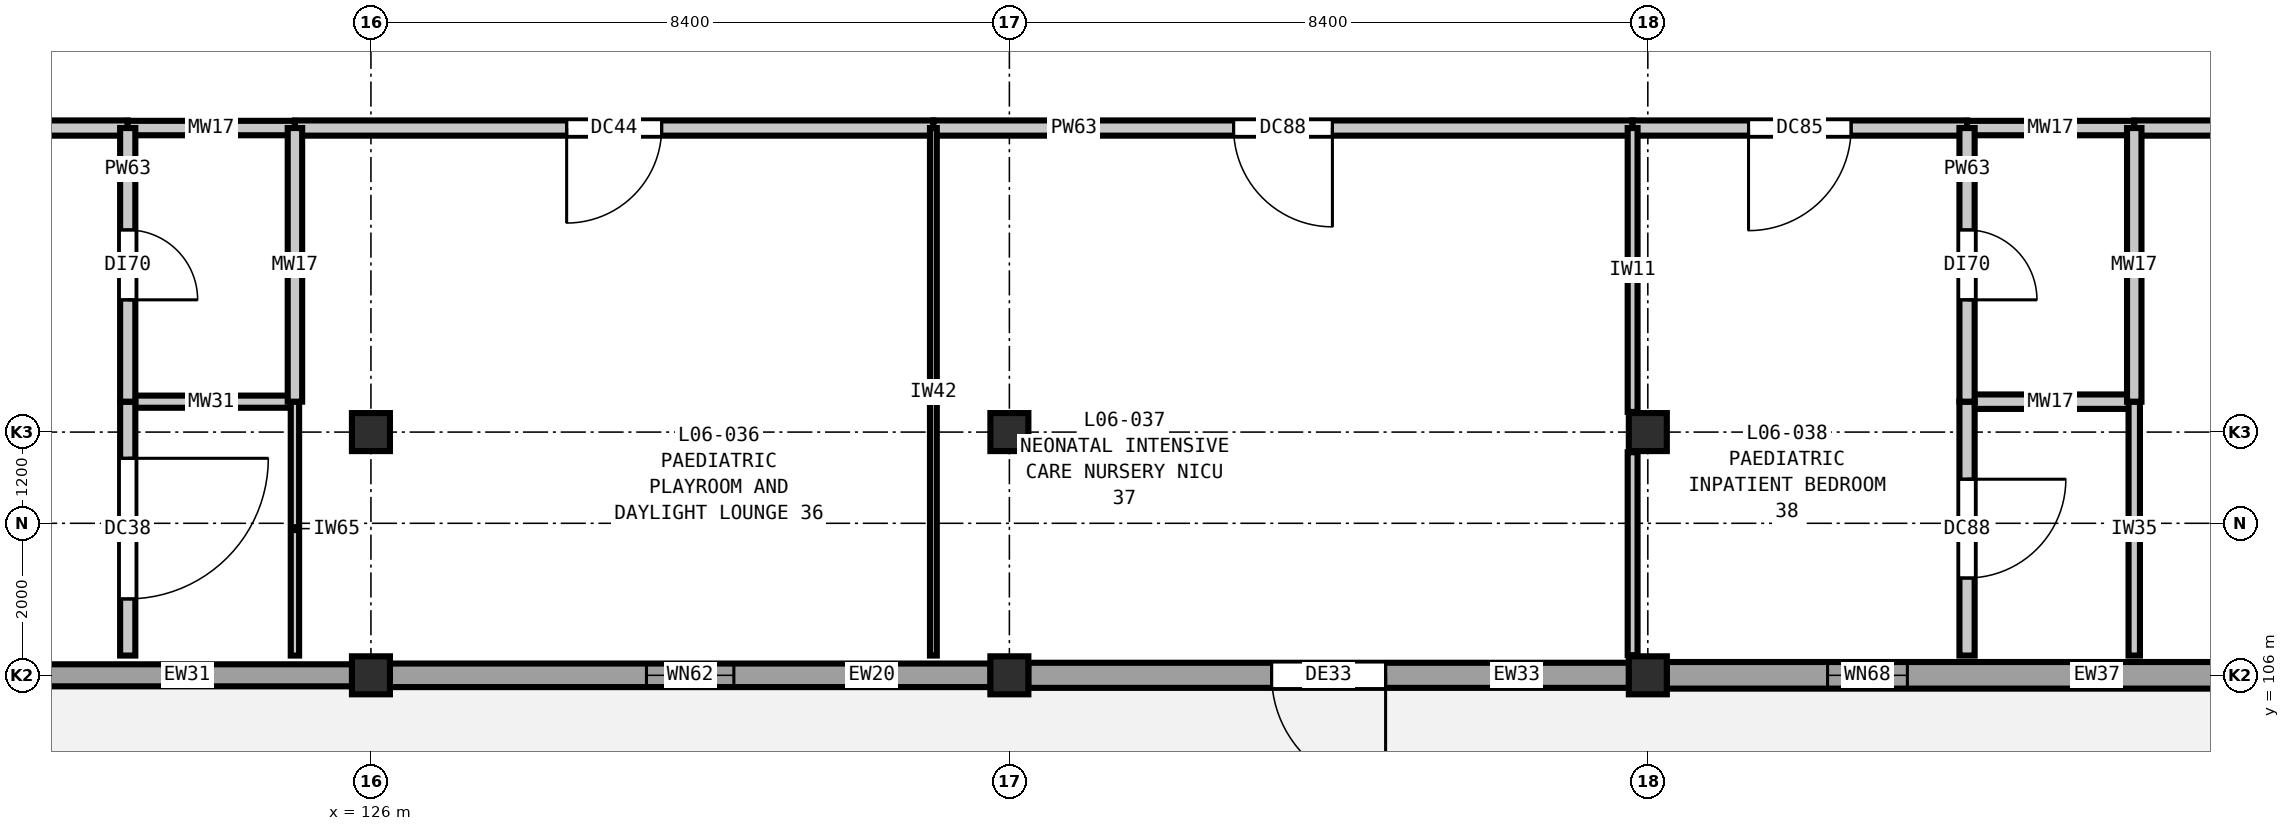
"""IFC4 building model, lengths in metres.
Left out: names, types, materials, properties, quantities, classifications, styles, units other than length and angle.
Written with IfcOpenShell. Run it as: python <this file> out.ifc"""

import sys

from ifc_helpers import new_model, si_unit, direction, frame, frame_2d, origin, origin_2d, place, context, subcontext, project, spatial, rectangle, extrude, element, fill, save


model = new_model("IFC4")
c1 = context("Model", 3, precision=1e-05, world=origin(), true_north=direction((0.0, 1.0)))
c2 = subcontext(c1, "Body", "Model", "MODEL_VIEW")
j1 = project(units=[si_unit("LENGTHUNIT", "METRE"), si_unit("PLANEANGLEUNIT", "RADIAN")], contexts=[c1])
p1 = place(None, origin())
s1 = spatial("IfcSite", under=j1, at=p1, CompositionType="ELEMENT")
p2 = place(p1, origin())
s2 = spatial("IfcBuilding", under=s1, at=p2, CompositionType="ELEMENT")
p3 = place(p2, frame((0.0, 0.0, 28.8)))
s3 = spatial("IfcBuildingStorey", under=s2, at=p3, CompositionType="ELEMENT", Elevation=28.8)
for number, where, z_axis, x_axis in (
    (1, (126.0, 106.0, 0.0), (0.0, 0.0, 1.0), (1.0, 0.0, 0.0)),
    (2, (126.0, 109.2, 0.0), (0.0, 0.0, 1.0), (1.0, 0.0, 0.0)),
    (3, (134.4, 106.0, 0.0), (0.0, 0.0, 1.0), (1.0, 0.0, 0.0)),
    (4, (134.4, 109.2, 0.0), (0.0, 0.0, 1.0), (1.0, 0.0, 0.0)),
    (5, (142.8, 106.0, 0.0), (0.0, 0.0, 1.0), (1.0, 0.0, 0.0)),
    (6, (142.8, 109.2, 0.0), (0.0, 0.0, 1.0), (1.0, 0.0, 0.0)),
):
    element("IfcColumn", number, at=place(p3, frame(where, z_axis=z_axis, x_axis=x_axis)), inside=s3, PredefinedType="COLUMN", context=c2, shape_type="SweptSolid", body=[
        extrude(rectangle(XDim=0.5, YDim=0.5, at=origin_2d()), origin(), (0.0, 0.0, 1.0), 4.2),
    ])
p4 = place(p3, frame((150.952, 106.0, 0.0), z_axis=(0.0, 0.0, 1.0), x_axis=(-1.0, 0.0, 0.0)))
e7 = element("IfcWall", 7, at=p4, inside=s3, PredefinedType="SOLIDWALL", context=c2, shape_type="SweptSolid", body=[
    extrude(rectangle(XDim=7.904, YDim=0.35, at=frame_2d((3.952, 0.0))), origin(), (0.0, 0.0, 1.0), 3.48),
])
p5 = place(p4, frame((4.737, 0.0, 0.9)))
e8 = element("IfcOpeningElement", 8, at=p5, cuts=e7, PredefinedType="OPENING", context=c2, shape_type="SweptSolid", body=[
    extrude(rectangle(XDim=1.05, YDim=1.4, at=frame_2d((0.525, 0.7))), frame((0.0, 0.185, 0.0), z_axis=(0.0, -1.0, 0.0), x_axis=(1.0, 0.0, 0.0)), (0.0, 0.0, 1.0), 0.37),
])
p6 = place(p3, frame((142.552, 106.0, 0.0), z_axis=(0.0, 0.0, 1.0), x_axis=(-1.0, 0.0, 0.0)))
e9 = element("IfcWall", 9, at=p6, inside=s3, PredefinedType="SOLIDWALL", context=c2, shape_type="SweptSolid", body=[
    extrude(rectangle(XDim=7.904, YDim=0.33, at=frame_2d((3.952, 0.0))), origin(), (0.0, 0.0, 1.0), 3.48),
])
p7 = place(p6, frame((3.202, 0.0, 0.0)))
e10 = element("IfcOpeningElement", 10, at=p7, cuts=e9, PredefinedType="OPENING", context=c2, shape_type="SweptSolid", body=[
    extrude(rectangle(XDim=1.5, YDim=2.2, at=frame_2d((0.75, 1.1))), frame((0.0, 0.175, 0.0), z_axis=(0.0, -1.0, 0.0), x_axis=(1.0, 0.0, 0.0)), (0.0, 0.0, 1.0), 0.35),
])
p8 = place(p3, frame((134.152, 106.0, 0.0), z_axis=(0.0, 0.0, 1.0), x_axis=(-1.0, 0.0, 0.0)))
e11 = element("IfcWall", 11, at=p8, inside=s3, PredefinedType="SOLIDWALL", context=c2, shape_type="SweptSolid", body=[
    extrude(rectangle(XDim=7.904, YDim=0.31, at=frame_2d((3.952, 0.0))), origin(), (0.0, 0.0, 1.0), 3.48),
])
p9 = place(p8, frame((3.377, 0.0, 0.9)))
e12 = element("IfcOpeningElement", 12, at=p9, cuts=e11, PredefinedType="OPENING", context=c2, shape_type="SweptSolid", body=[
    extrude(rectangle(XDim=1.15, YDim=1.4, at=frame_2d((0.575, 0.7))), frame((0.0, 0.165, 0.0), z_axis=(0.0, -1.0, 0.0), x_axis=(1.0, 0.0, 0.0)), (0.0, 0.0, 1.0), 0.33),
])
p10 = place(p3, frame((125.752, 106.0, 0.0), z_axis=(0.0, 0.0, 1.0), x_axis=(-1.0, 0.0, 0.0)))
e13 = element("IfcWall", 13, at=p10, inside=s3, PredefinedType="SOLIDWALL", context=c2, shape_type="SweptSolid", body=[
    extrude(rectangle(XDim=7.904, YDim=0.29, at=frame_2d((3.952, 0.0))), origin(), (0.0, 0.0, 1.0), 3.48),
])
p11 = place(p10, frame((4.593, 0.0, 0.9)))
e14 = element("IfcOpeningElement", 14, at=p11, cuts=e13, PredefinedType="OPENING", context=c2, shape_type="SweptSolid", body=[
    extrude(rectangle(XDim=1.25, YDim=1.4, at=frame_2d((0.625, 0.7))), frame((0.0, 0.155, 0.0), z_axis=(0.0, -1.0, 0.0), x_axis=(1.0, 0.0, 0.0)), (0.0, 0.0, 1.0), 0.31),
])
p12 = place(p3, frame((122.8, 109.6, 0.0), z_axis=(0.0, 0.0, 1.0), x_axis=(1.0, 0.0, 0.0)))
e15 = element("IfcWall", 15, at=p12, inside=s3, PredefinedType="PLUMBINGWALL", context=c2, shape_type="SweptSolid", body=[
    extrude(rectangle(XDim=2.2, YDim=0.16, at=frame_2d((1.1, 0.0))), origin(), (0.0, 0.0, 1.0), 3.92),
])
p13 = place(p3, frame((147.0, 109.6, 0.0), z_axis=(0.0, 0.0, 1.0), x_axis=(1.0, 0.0, 0.0)))
e16 = element("IfcWall", 16, at=p13, inside=s3, PredefinedType="PLUMBINGWALL", context=c2, shape_type="SweptSolid", body=[
    extrude(rectangle(XDim=2.2, YDim=0.19, at=frame_2d((1.1, 0.0))), origin(), (0.0, 0.0, 1.0), 3.92),
])
p14 = place(p3, frame((118.4, 113.2, 0.0), z_axis=(0.0, 0.0, 1.0), x_axis=(1.0, 0.0, 0.0)))
e17 = element("IfcWall", 17, at=p14, inside=s3, PredefinedType="PARTITIONING", context=c2, shape_type="SweptSolid", body=[
    extrude(rectangle(XDim=4.4, YDim=0.2, at=frame_2d((2.2, 0.0))), origin(), (0.0, 0.0, 1.0), 3.92),
])
p15 = place(p14, frame((1.275, 0.0, 0.0)))
e18 = element("IfcOpeningElement", 18, at=p15, cuts=e17, PredefinedType="OPENING", context=c2, shape_type="SweptSolid", body=[
    extrude(rectangle(XDim=1.85, YDim=2.3, at=frame_2d((0.925, 1.15))), frame((0.0, 0.11, 0.0), z_axis=(0.0, -1.0, 0.0), x_axis=(1.0, 0.0, 0.0)), (0.0, 0.0, 1.0), 0.22),
])
p16 = place(p3, frame((122.8, 113.2, 0.0), z_axis=(0.0, 0.0, 1.0), x_axis=(1.0, 0.0, 0.0)))
e19 = element("IfcWall", 19, at=p16, inside=s3, PredefinedType="PLUMBINGWALL", context=c2, shape_type="SweptSolid", body=[
    extrude(rectangle(XDim=2.2, YDim=0.19, at=frame_2d((1.1, 0.0))), origin(), (0.0, 0.0, 1.0), 3.92),
])
p17 = place(p3, frame((125.0, 113.2, 0.0), z_axis=(0.0, 0.0, 1.0), x_axis=(1.0, 0.0, 0.0)))
e20 = element("IfcWall", 20, at=p17, inside=s3, PredefinedType="PARTITIONING", context=c2, shape_type="SweptSolid", body=[
    extrude(rectangle(XDim=8.4, YDim=0.2, at=frame_2d((4.2, 0.0))), origin(), (0.0, 0.0, 1.0), 3.92),
])
p18 = place(p17, frame((3.575, 0.0, 0.0)))
e21 = element("IfcOpeningElement", 21, at=p18, cuts=e20, PredefinedType="OPENING", context=c2, shape_type="SweptSolid", body=[
    extrude(rectangle(XDim=1.25, YDim=2.15, at=frame_2d((0.625, 1.075))), frame((0.0, 0.11, 0.0), z_axis=(0.0, -1.0, 0.0), x_axis=(1.0, 0.0, 0.0)), (0.0, 0.0, 1.0), 0.22),
])
p19 = place(p3, frame((133.4, 113.2, 0.0), z_axis=(0.0, 0.0, 1.0), x_axis=(1.0, 0.0, 0.0)))
e22 = element("IfcWall", 22, at=p19, inside=s3, PredefinedType="PARTITIONING", context=c2, shape_type="SweptSolid", body=[
    extrude(rectangle(XDim=9.2, YDim=0.2, at=frame_2d((4.6, 0.0))), origin(), (0.0, 0.0, 1.0), 3.92),
])
p20 = place(p19, frame((3.95, 0.0, 0.0)))
e23 = element("IfcOpeningElement", 23, at=p20, cuts=e22, PredefinedType="OPENING", context=c2, shape_type="SweptSolid", body=[
    extrude(rectangle(XDim=1.3, YDim=2.2, at=frame_2d((0.65, 1.1))), frame((0.0, 0.11, 0.0), z_axis=(0.0, -1.0, 0.0), x_axis=(1.0, 0.0, 0.0)), (0.0, 0.0, 1.0), 0.22),
])
p21 = place(p3, frame((142.6, 113.2, 0.0), z_axis=(0.0, 0.0, 1.0), x_axis=(1.0, 0.0, 0.0)))
e24 = element("IfcWall", 24, at=p21, inside=s3, PredefinedType="PARTITIONING", context=c2, shape_type="SweptSolid", body=[
    extrude(rectangle(XDim=4.4, YDim=0.2, at=frame_2d((2.2, 0.0))), origin(), (0.0, 0.0, 1.0), 3.92),
])
p22 = place(p21, frame((1.525, 0.0, 0.0)))
e25 = element("IfcOpeningElement", 25, at=p22, cuts=e24, PredefinedType="OPENING", context=c2, shape_type="SweptSolid", body=[
    extrude(rectangle(XDim=1.35, YDim=2.2, at=frame_2d((0.675, 1.1))), frame((0.0, 0.11, 0.0), z_axis=(0.0, -1.0, 0.0), x_axis=(1.0, 0.0, 0.0)), (0.0, 0.0, 1.0), 0.22),
])
p23 = place(p3, frame((147.0, 113.2, 0.0), z_axis=(0.0, 0.0, 1.0), x_axis=(1.0, 0.0, 0.0)))
e26 = element("IfcWall", 26, at=p23, inside=s3, PredefinedType="PLUMBINGWALL", context=c2, shape_type="SweptSolid", body=[
    extrude(rectangle(XDim=2.2, YDim=0.19, at=frame_2d((1.1, 0.0))), origin(), (0.0, 0.0, 1.0), 3.92),
])
p24 = place(p3, frame((149.2, 113.2, 0.0), z_axis=(0.0, 0.0, 1.0), x_axis=(1.0, 0.0, 0.0)))
e27 = element("IfcWall", 27, at=p24, inside=s3, PredefinedType="PARTITIONING", context=c2, shape_type="SweptSolid", body=[
    extrude(rectangle(XDim=8.4, YDim=0.2, at=frame_2d((4.2, 0.0))), origin(), (0.0, 0.0, 1.0), 3.92),
])
p25 = place(p24, frame((3.475, 0.0, 0.0)))
e28 = element("IfcOpeningElement", 28, at=p25, cuts=e27, PredefinedType="OPENING", context=c2, shape_type="SweptSolid", body=[
    extrude(rectangle(XDim=1.45, YDim=2.25, at=frame_2d((0.725, 1.125))), frame((0.0, 0.11, 0.0), z_axis=(0.0, -1.0, 0.0), x_axis=(1.0, 0.0, 0.0)), (0.0, 0.0, 1.0), 0.22),
])
p26 = place(p3, frame((122.8, 106.26, 0.0), z_axis=(0.0, 0.0, 1.0), x_axis=(0.0, 1.0, 0.0)))
e29 = element("IfcWall", 29, at=p26, inside=s3, PredefinedType="PARTITIONING", context=c2, shape_type="SweptSolid", body=[
    extrude(rectangle(XDim=3.34, YDim=0.2, at=frame_2d((1.67, 0.0))), origin(), (0.0, 0.0, 1.0), 3.92),
])
p27 = place(p26, frame((0.745, 0.0, 0.0)))
e30 = element("IfcOpeningElement", 30, at=p27, cuts=e29, PredefinedType="OPENING", context=c2, shape_type="SweptSolid", body=[
    extrude(rectangle(XDim=1.85, YDim=2.3, at=frame_2d((0.925, 1.15))), frame((0.0, 0.11, 0.0), z_axis=(0.0, -1.0, 0.0), x_axis=(1.0, 0.0, 0.0)), (0.0, 0.0, 1.0), 0.22),
])
p28 = place(p3, frame((122.8, 109.6, 0.0), z_axis=(0.0, 0.0, 1.0), x_axis=(0.0, 1.0, 0.0)))
e31 = element("IfcWall", 31, at=p28, inside=s3, PredefinedType="PARTITIONING", context=c2, shape_type="SweptSolid", body=[
    extrude(rectangle(XDim=3.6, YDim=0.2, at=frame_2d((1.8, 0.0))), origin(), (0.0, 0.0, 1.0), 3.92),
])
p29 = place(p28, frame((1.34, 0.0, 0.0)))
e32 = element("IfcOpeningElement", 32, at=p29, cuts=e31, PredefinedType="OPENING", context=c2, shape_type="SweptSolid", body=[
    extrude(rectangle(XDim=0.92, YDim=2.1, at=frame_2d((0.46, 1.05))), frame((0.0, 0.11, 0.0), z_axis=(0.0, -1.0, 0.0), x_axis=(1.0, 0.0, 0.0)), (0.0, 0.0, 1.0), 0.22),
])
p30 = place(p3, frame((125.0, 106.26, 0.0), z_axis=(0.0, 0.0, 1.0), x_axis=(0.0, 1.0, 0.0)))
e33 = element("IfcWall", 33, at=p30, inside=s3, PredefinedType="PARTITIONING", context=c2, shape_type="SweptSolid", body=[
    extrude(rectangle(XDim=3.34, YDim=0.11, at=frame_2d((1.67, 0.0))), origin(), (0.0, 0.0, 1.0), 3.92),
])
p31 = place(p3, frame((125.0, 109.6, 0.0), z_axis=(0.0, 0.0, 1.0), x_axis=(0.0, 1.0, 0.0)))
e34 = element("IfcWall", 34, at=p31, inside=s3, PredefinedType="PLUMBINGWALL", context=c2, shape_type="SweptSolid", body=[
    extrude(rectangle(XDim=3.6, YDim=0.19, at=frame_2d((1.8, 0.0))), origin(), (0.0, 0.0, 1.0), 3.92),
])
p32 = place(p3, frame((133.4, 106.26, 0.0), z_axis=(0.0, 0.0, 1.0), x_axis=(0.0, 1.0, 0.0)))
e35 = element("IfcWall", 35, at=p32, inside=s3, PredefinedType="PARTITIONING", context=c2, shape_type="SweptSolid", body=[
    extrude(rectangle(XDim=6.94, YDim=0.09, at=frame_2d((3.47, 0.0))), origin(), (0.0, 0.0, 1.0), 3.92),
])
p33 = place(p3, frame((142.6, 109.465, 0.0), z_axis=(0.0, 0.0, 1.0), x_axis=(0.0, 1.0, 0.0)))
e36 = element("IfcWall", 36, at=p33, inside=s3, PredefinedType="PARTITIONING", context=c2, shape_type="SweptSolid", body=[
    extrude(rectangle(XDim=3.735, YDim=0.13, at=frame_2d((1.867, 0.0))), origin(), (0.0, 0.0, 1.0), 3.635),
])
p34 = place(p3, frame((142.6, 106.265, 0.0), z_axis=(0.0, 0.0, 1.0), x_axis=(0.0, 1.0, 0.0)))
e37 = element("IfcWall", 37, at=p34, inside=s3, PredefinedType="PARTITIONING", context=c2, shape_type="SweptSolid", body=[
    extrude(rectangle(XDim=2.67, YDim=0.13, at=frame_2d((1.335, 0.0))), origin(), (0.0, 0.0, 1.0), 3.635),
])
p35 = place(p3, frame((147.0, 106.26, 0.0), z_axis=(0.0, 0.0, 1.0), x_axis=(0.0, 1.0, 0.0)))
e38 = element("IfcWall", 38, at=p35, inside=s3, PredefinedType="PARTITIONING", context=c2, shape_type="SweptSolid", body=[
    extrude(rectangle(XDim=3.34, YDim=0.2, at=frame_2d((1.67, 0.0))), origin(), (0.0, 0.0, 1.0), 3.92),
])
p36 = place(p35, frame((1.02, 0.0, 0.0)))
e39 = element("IfcOpeningElement", 39, at=p36, cuts=e38, PredefinedType="OPENING", context=c2, shape_type="SweptSolid", body=[
    extrude(rectangle(XDim=1.3, YDim=2.2, at=frame_2d((0.65, 1.1))), frame((0.0, 0.11, 0.0), z_axis=(0.0, -1.0, 0.0), x_axis=(1.0, 0.0, 0.0)), (0.0, 0.0, 1.0), 0.22),
])
p37 = place(p3, frame((147.0, 109.6, 0.0), z_axis=(0.0, 0.0, 1.0), x_axis=(0.0, 1.0, 0.0)))
e40 = element("IfcWall", 40, at=p37, inside=s3, PredefinedType="PARTITIONING", context=c2, shape_type="SweptSolid", body=[
    extrude(rectangle(XDim=3.6, YDim=0.2, at=frame_2d((1.8, 0.0))), origin(), (0.0, 0.0, 1.0), 3.92),
])
p38 = place(p37, frame((1.34, 0.0, 0.0)))
e41 = element("IfcOpeningElement", 41, at=p38, cuts=e40, PredefinedType="OPENING", context=c2, shape_type="SweptSolid", body=[
    extrude(rectangle(XDim=0.92, YDim=2.1, at=frame_2d((0.46, 1.05))), frame((0.0, 0.11, 0.0), z_axis=(0.0, -1.0, 0.0), x_axis=(1.0, 0.0, 0.0)), (0.0, 0.0, 1.0), 0.22),
])
p39 = place(p3, frame((149.2, 106.26, 0.0), z_axis=(0.0, 0.0, 1.0), x_axis=(0.0, 1.0, 0.0)))
e42 = element("IfcWall", 42, at=p39, inside=s3, PredefinedType="PARTITIONING", context=c2, shape_type="SweptSolid", body=[
    extrude(rectangle(XDim=3.34, YDim=0.15, at=frame_2d((1.67, 0.0))), origin(), (0.0, 0.0, 1.0), 3.92),
])
p40 = place(p3, frame((149.2, 109.6, 0.0), z_axis=(0.0, 0.0, 1.0), x_axis=(0.0, 1.0, 0.0)))
e43 = element("IfcWall", 43, at=p40, inside=s3, PredefinedType="PLUMBINGWALL", context=c2, shape_type="SweptSolid", body=[
    extrude(rectangle(XDim=3.6, YDim=0.19, at=frame_2d((1.8, 0.0))), origin(), (0.0, 0.0, 1.0), 3.92),
])
p41 = place(p5, origin())
e44 = element("IfcWindow", 44, at=p41, inside=s3, PartitioningType="SINGLE_PANEL", PredefinedType="WINDOW", context=c2, shape_type="SweptSolid", body=[
    extrude(rectangle(XDim=1.05, YDim=1.4, at=frame_2d((0.525, 0.7))), frame((0.0, 0.03, 0.0), z_axis=(0.0, -1.0, 0.0), x_axis=(1.0, 0.0, 0.0)), (0.0, 0.0, 1.0), 0.06),
])
fill(e8, e44)
p42 = place(p7, origin())
e45 = element("IfcDoor", 45, at=p42, inside=s3, OperationType="SINGLE_SWING_LEFT", PredefinedType="DOOR", context=c2, shape_type="SweptSolid", body=[
    extrude(rectangle(XDim=1.5, YDim=2.2, at=frame_2d((0.75, 1.1))), frame((0.0, 0.025, 0.0), z_axis=(0.0, -1.0, 0.0), x_axis=(1.0, 0.0, 0.0)), (0.0, 0.0, 1.0), 0.05),
])
fill(e10, e45)
p43 = place(p9, origin())
e46 = element("IfcWindow", 46, at=p43, inside=s3, PartitioningType="SINGLE_PANEL", PredefinedType="WINDOW", context=c2, shape_type="SweptSolid", body=[
    extrude(rectangle(XDim=1.15, YDim=1.4, at=frame_2d((0.575, 0.7))), frame((0.0, 0.03, 0.0), z_axis=(0.0, -1.0, 0.0), x_axis=(1.0, 0.0, 0.0)), (0.0, 0.0, 1.0), 0.06),
])
fill(e12, e46)
p44 = place(p18, frame((1.25, 0.0, 0.0), z_axis=(0.0, 0.0, 1.0), x_axis=(-1.0, 0.0, 0.0)))
e47 = element("IfcDoor", 47, at=p44, inside=s3, OperationType="SINGLE_SWING_RIGHT", PredefinedType="DOOR", context=c2, shape_type="SweptSolid", body=[
    extrude(rectangle(XDim=1.25, YDim=2.15, at=frame_2d((0.625, 1.075))), frame((0.0, 0.025, 0.0), z_axis=(0.0, -1.0, 0.0), x_axis=(1.0, 0.0, 0.0)), (0.0, 0.0, 1.0), 0.05),
])
fill(e21, e47)
p45 = place(p20, frame((1.3, 0.0, 0.0), z_axis=(0.0, 0.0, 1.0), x_axis=(-1.0, 0.0, 0.0)))
e48 = element("IfcDoor", 48, at=p45, inside=s3, OperationType="SINGLE_SWING_LEFT", PredefinedType="DOOR", context=c2, shape_type="SweptSolid", body=[
    extrude(rectangle(XDim=1.3, YDim=2.2, at=frame_2d((0.65, 1.1))), frame((0.0, 0.025, 0.0), z_axis=(0.0, -1.0, 0.0), x_axis=(1.0, 0.0, 0.0)), (0.0, 0.0, 1.0), 0.05),
])
fill(e23, e48)
p46 = place(p22, frame((1.35, 0.0, 0.0), z_axis=(0.0, 0.0, 1.0), x_axis=(-1.0, 0.0, 0.0)))
e49 = element("IfcDoor", 49, at=p46, inside=s3, OperationType="SINGLE_SWING_RIGHT", PredefinedType="DOOR", context=c2, shape_type="SweptSolid", body=[
    extrude(rectangle(XDim=1.35, YDim=2.2, at=frame_2d((0.675, 1.1))), frame((0.0, 0.025, 0.0), z_axis=(0.0, -1.0, 0.0), x_axis=(1.0, 0.0, 0.0)), (0.0, 0.0, 1.0), 0.05),
])
fill(e25, e49)
p47 = place(p27, frame((1.85, 0.0, 0.0), z_axis=(0.0, 0.0, 1.0), x_axis=(-1.0, 0.0, 0.0)))
e50 = element("IfcDoor", 50, at=p47, inside=s3, OperationType="SINGLE_SWING_LEFT", PredefinedType="DOOR", context=c2, shape_type="SweptSolid", body=[
    extrude(rectangle(XDim=1.85, YDim=2.3, at=frame_2d((0.925, 1.15))), frame((0.0, 0.025, 0.0), z_axis=(0.0, -1.0, 0.0), x_axis=(1.0, 0.0, 0.0)), (0.0, 0.0, 1.0), 0.05),
])
fill(e30, e50)
p48 = place(p29, frame((0.92, 0.0, 0.0), z_axis=(0.0, 0.0, 1.0), x_axis=(-1.0, 0.0, 0.0)))
e51 = element("IfcDoor", 51, at=p48, inside=s3, OperationType="SINGLE_SWING_RIGHT", PredefinedType="DOOR", context=c2, shape_type="SweptSolid", body=[
    extrude(rectangle(XDim=0.92, YDim=2.1, at=frame_2d((0.46, 1.05))), frame((0.0, 0.025, 0.0), z_axis=(0.0, -1.0, 0.0), x_axis=(1.0, 0.0, 0.0)), (0.0, 0.0, 1.0), 0.05),
])
fill(e32, e51)
p49 = place(p36, frame((1.3, 0.0, 0.0), z_axis=(0.0, 0.0, 1.0), x_axis=(-1.0, 0.0, 0.0)))
e52 = element("IfcDoor", 52, at=p49, inside=s3, OperationType="SINGLE_SWING_LEFT", PredefinedType="DOOR", context=c2, shape_type="SweptSolid", body=[
    extrude(rectangle(XDim=1.3, YDim=2.2, at=frame_2d((0.65, 1.1))), frame((0.0, 0.025, 0.0), z_axis=(0.0, -1.0, 0.0), x_axis=(1.0, 0.0, 0.0)), (0.0, 0.0, 1.0), 0.05),
])
fill(e39, e52)
p50 = place(p38, frame((0.92, 0.0, 0.0), z_axis=(0.0, 0.0, 1.0), x_axis=(-1.0, 0.0, 0.0)))
e53 = element("IfcDoor", 53, at=p50, inside=s3, OperationType="SINGLE_SWING_RIGHT", PredefinedType="DOOR", context=c2, shape_type="SweptSolid", body=[
    extrude(rectangle(XDim=0.92, YDim=2.1, at=frame_2d((0.46, 1.05))), frame((0.0, 0.025, 0.0), z_axis=(0.0, -1.0, 0.0), x_axis=(1.0, 0.0, 0.0)), (0.0, 0.0, 1.0), 0.05),
])
fill(e41, e53)
save(model, sys.argv[1])
